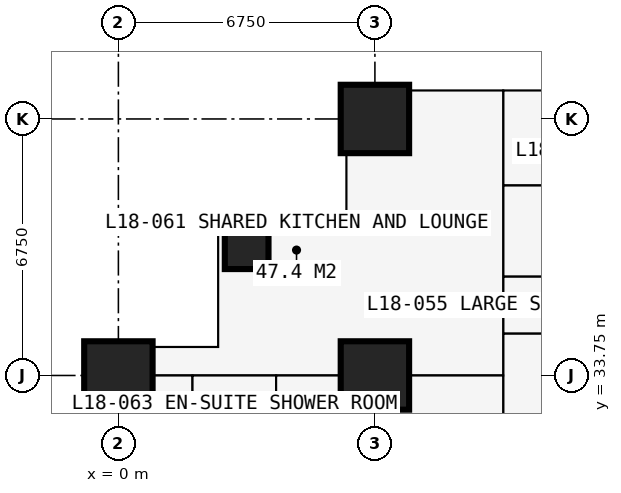
"""IFC4 building model, lengths in metres.
Left out: names, types, materials, properties, quantities, classifications, styles, units other than length and angle.
Written with IfcOpenShell. Run it as: python <this file> out.ifc"""

import sys

from ifc_helpers import new_model, si_unit, direction, frame, frame_2d, origin, origin_2d, place, context, subcontext, project, spatial, rectangle, extrude, element, fill, save


model = new_model("IFC4")
c1 = context("Model", 3, precision=1e-05, world=origin(), true_north=direction((0.0, 1.0)))
c2 = subcontext(c1, "Body", "Model", "MODEL_VIEW")
j1 = project(units=[si_unit("LENGTHUNIT", "METRE"), si_unit("PLANEANGLEUNIT", "RADIAN")], contexts=[c1])
p1 = place(None, origin())
s1 = spatial("IfcSite", under=j1, at=p1, CompositionType="ELEMENT")
p2 = place(p1, origin())
s2 = spatial("IfcBuilding", under=s1, at=p2, CompositionType="ELEMENT")
p3 = place(p2, frame((0.0, 0.0, 68.4)))
s3 = spatial("IfcBuildingStorey", under=s2, at=p3, CompositionType="ELEMENT", Elevation=68.4)
p4 = place(p3, frame((0.0, 33.75, 0.0), z_axis=(0.0, 0.0, 1.0), x_axis=(1.0, 0.0, 0.0)))
e1 = element("IfcColumn", 1, at=p4, inside=s3, PredefinedType="COLUMN", context=c2, shape_type="SweptSolid", body=[
    extrude(rectangle(XDim=1.8, YDim=1.8, at=origin_2d()), origin(), (0.0, 0.0, 1.0), 3.6),
])
p5 = place(p3, frame((3.375, 37.125, 0.0), z_axis=(0.0, 0.0, 1.0), x_axis=(1.0, 0.0, 0.0)))
e2 = element("IfcColumn", 2, at=p5, inside=s3, PredefinedType="COLUMN", context=c2, shape_type="SweptSolid", body=[
    extrude(rectangle(XDim=1.15, YDim=1.15, at=origin_2d()), origin(), (0.0, 0.0, 1.0), 3.6),
])
for number, where, z_axis, x_axis in (
    (3, (6.75, 33.75, 0.0), (0.0, 0.0, 1.0), (1.0, 0.0, 0.0)),
    (4, (6.75, 40.5, 0.0), (0.0, 0.0, 1.0), (1.0, 0.0, 0.0)),
):
    element("IfcColumn", number, at=place(p3, frame(where, z_axis=z_axis, x_axis=x_axis)), inside=s3, PredefinedType="COLUMN", context=c2, shape_type="SweptSolid", body=[
        extrude(rectangle(XDim=1.8, YDim=1.8, at=origin_2d()), origin(), (0.0, 0.0, 1.0), 3.6),
    ])
p6 = place(p3, frame((6.0, 41.25, 0.0), z_axis=(0.0, 0.0, 1.0), x_axis=(0.0, -1.0, 0.0)))
e5 = element("IfcWall", 5, at=p6, inside=s3, PredefinedType="SOLIDWALL", context=c2, shape_type="SweptSolid", body=[
    extrude(rectangle(XDim=3.375, YDim=0.3, at=frame_2d((1.688, 0.0))), origin(), (0.0, 0.0, 1.0), 3.375),
])
p7 = place(p6, frame((1.833, 0.0, 0.9)))
e6 = element("IfcOpeningElement", 6, at=p7, cuts=e5, PredefinedType="OPENING", context=c2, shape_type="SweptSolid", body=[
    extrude(rectangle(XDim=1.2, YDim=1.8, at=frame_2d((0.6, 0.9))), frame((0.0, 0.16, 0.0), z_axis=(0.0, -1.0, 0.0), x_axis=(1.0, 0.0, 0.0)), (0.0, 0.0, 1.0), 0.32),
])
p8 = place(p3, frame((6.0, 37.875, 0.0), z_axis=(0.0, 0.0, 1.0), x_axis=(-1.0, 0.0, 0.0)))
e7 = element("IfcWall", 7, at=p8, inside=s3, PredefinedType="SOLIDWALL", context=c2, shape_type="SweptSolid", body=[
    extrude(rectangle(XDim=3.375, YDim=0.3, at=frame_2d((1.688, 0.0))), origin(), (0.0, 0.0, 1.0), 3.375),
])
p9 = place(p8, frame((0.788, 0.0, 0.6)))
e8 = element("IfcOpeningElement", 8, at=p9, cuts=e7, PredefinedType="OPENING", context=c2, shape_type="SweptSolid", body=[
    extrude(rectangle(XDim=1.8, YDim=2.1, at=frame_2d((0.9, 1.05))), frame((0.0, 0.16, 0.0), z_axis=(0.0, -1.0, 0.0), x_axis=(1.0, 0.0, 0.0)), (0.0, 0.0, 1.0), 0.32),
])
p10 = place(p3, frame((2.625, 37.875, 0.0), z_axis=(0.0, 0.0, 1.0), x_axis=(0.0, -1.0, 0.0)))
e9 = element("IfcWall", 9, at=p10, inside=s3, PredefinedType="SOLIDWALL", context=c2, shape_type="SweptSolid", body=[
    extrude(rectangle(XDim=3.375, YDim=0.3, at=frame_2d((1.688, 0.0))), origin(), (0.0, 0.0, 1.0), 3.375),
])
p11 = place(p10, frame((0.788, 0.0, 0.6)))
e10 = element("IfcOpeningElement", 10, at=p11, cuts=e9, PredefinedType="OPENING", context=c2, shape_type="SweptSolid", body=[
    extrude(rectangle(XDim=1.8, YDim=2.1, at=frame_2d((0.9, 1.05))), frame((0.0, 0.16, 0.0), z_axis=(0.0, -1.0, 0.0), x_axis=(1.0, 0.0, 0.0)), (0.0, 0.0, 1.0), 0.32),
])
p12 = place(p3, frame((2.625, 34.5, 0.0), z_axis=(0.0, 0.0, 1.0), x_axis=(-1.0, 0.0, 0.0)))
e11 = element("IfcWall", 11, at=p12, inside=s3, PredefinedType="SOLIDWALL", context=c2, shape_type="SweptSolid", body=[
    extrude(rectangle(XDim=3.375, YDim=0.3, at=frame_2d((1.688, 0.0))), origin(), (0.0, 0.0, 1.0), 3.375),
])
p13 = place(p12, frame((0.343, 0.0, 0.9)))
e12 = element("IfcOpeningElement", 12, at=p13, cuts=e11, PredefinedType="OPENING", context=c2, shape_type="SweptSolid", body=[
    extrude(rectangle(XDim=1.2, YDim=1.8, at=frame_2d((0.6, 0.9))), frame((0.0, 0.16, 0.0), z_axis=(0.0, -1.0, 0.0), x_axis=(1.0, 0.0, 0.0)), (0.0, 0.0, 1.0), 0.32),
])
p14 = place(p3, frame((-0.734, 33.75, 0.0), z_axis=(0.0, 0.0, 1.0), x_axis=(1.0, 0.0, 0.0)))
e13 = element("IfcWall", 13, at=p14, inside=s3, PredefinedType="PARTITIONING", context=c2, shape_type="SweptSolid", body=[
    extrude(rectangle(XDim=10.859, YDim=0.15, at=frame_2d((5.429, 0.0))), origin(), (0.0, 0.0, 1.0), 2.877),
])
p15 = place(p14, frame((8.434, 0.0, 0.0)))
e14 = element("IfcOpeningElement", 14, at=p15, cuts=e13, PredefinedType="OPENING", context=c2, shape_type="SweptSolid", body=[
    extrude(rectangle(XDim=1.0, YDim=2.2, at=frame_2d((0.5, 1.1))), frame((0.0, 0.085, 0.0), z_axis=(0.0, -1.0, 0.0), x_axis=(1.0, 0.0, 0.0)), (0.0, 0.0, 1.0), 0.17),
])
p16 = place(p3, frame((1.95, 31.75, 0.0), z_axis=(0.0, 0.0, 1.0), x_axis=(0.0, 1.0, 0.0)))
e15 = element("IfcWall", 15, at=p16, inside=s3, PredefinedType="PARTITIONING", context=c2, shape_type="SweptSolid", body=[
    extrude(rectangle(XDim=2.0, YDim=0.1, at=frame_2d((1.0, 0.0))), origin(), (0.0, 0.0, 1.0), 3.375),
])
p17 = place(p3, frame((4.15, 10.125, 0.0), z_axis=(0.0, 0.0, 1.0), x_axis=(0.0, 1.0, 0.0)))
e16 = element("IfcWall", 16, at=p17, inside=s3, PredefinedType="PARTITIONING", context=c2, shape_type="SweptSolid", body=[
    extrude(rectangle(XDim=23.625, YDim=0.15, at=frame_2d((11.812, 0.0))), origin(), (0.0, 0.0, 1.0), 3.375),
])
p18 = place(p17, frame((20.5, 0.0, 0.0)))
e17 = element("IfcOpeningElement", 17, at=p18, cuts=e16, PredefinedType="OPENING", context=c2, shape_type="SweptSolid", body=[
    extrude(rectangle(XDim=0.95, YDim=2.2, at=frame_2d((0.475, 1.1))), frame((0.0, 0.085, 0.0), z_axis=(0.0, -1.0, 0.0), x_axis=(1.0, 0.0, 0.0)), (0.0, 0.0, 1.0), 0.17),
])
p19 = place(p17, frame((17.125, 0.0, 0.0)))
e18 = element("IfcOpeningElement", 18, at=p19, cuts=e16, PredefinedType="OPENING", context=c2, shape_type="SweptSolid", body=[
    extrude(rectangle(XDim=0.95, YDim=2.2, at=frame_2d((0.475, 1.1))), frame((0.0, 0.085, 0.0), z_axis=(0.0, -1.0, 0.0), x_axis=(1.0, 0.0, 0.0)), (0.0, 0.0, 1.0), 0.17),
])
p20 = place(p17, frame((13.7, 0.0, 0.0)))
e19 = element("IfcOpeningElement", 19, at=p20, cuts=e16, PredefinedType="OPENING", context=c2, shape_type="SweptSolid", body=[
    extrude(rectangle(XDim=0.95, YDim=2.2, at=frame_2d((0.475, 1.1))), frame((0.0, 0.085, 0.0), z_axis=(0.0, -1.0, 0.0), x_axis=(1.0, 0.0, 0.0)), (0.0, 0.0, 1.0), 0.17),
])
p21 = place(p17, frame((4.2, 0.0, 0.0)))
e20 = element("IfcOpeningElement", 20, at=p21, cuts=e16, PredefinedType="OPENING", context=c2, shape_type="SweptSolid", body=[
    extrude(rectangle(XDim=0.95, YDim=2.2, at=frame_2d((0.475, 1.1))), frame((0.0, 0.085, 0.0), z_axis=(0.0, -1.0, 0.0), x_axis=(1.0, 0.0, 0.0)), (0.0, 0.0, 1.0), 0.17),
])
p22 = place(p17, frame((10.95, 0.0, 0.0)))
e21 = element("IfcOpeningElement", 21, at=p22, cuts=e16, PredefinedType="OPENING", context=c2, shape_type="SweptSolid", body=[
    extrude(rectangle(XDim=0.95, YDim=2.2, at=frame_2d((0.475, 1.1))), frame((0.0, 0.085, 0.0), z_axis=(0.0, -1.0, 0.0), x_axis=(1.0, 0.0, 0.0)), (0.0, 0.0, 1.0), 0.17),
])
p23 = place(p3, frame((10.125, 30.375, 0.0), z_axis=(0.0, 0.0, 1.0), x_axis=(0.0, 1.0, 0.0)))
e22 = element("IfcWall", 22, at=p23, inside=s3, PredefinedType="PARTITIONING", context=c2, shape_type="SweptSolid", body=[
    extrude(rectangle(XDim=10.859, YDim=0.15, at=frame_2d((5.429, 0.0))), origin(), (0.0, 0.0, 1.0), 3.375),
])
p24 = place(p3, frame((10.125, 34.85, 0.0), z_axis=(0.0, 0.0, 1.0), x_axis=(1.0, 0.0, 0.0)))
e23 = element("IfcWall", 23, at=p24, inside=s3, PredefinedType="PARTITIONING", context=c2, shape_type="SweptSolid", body=[
    extrude(rectangle(XDim=10.762, YDim=0.15, at=frame_2d((5.381, 0.0))), origin(), (0.0, 0.0, 1.0), 3.375),
])
p25 = place(p24, frame((4.9, 0.0, 0.0)))
e24 = element("IfcOpeningElement", 24, at=p25, cuts=e23, PredefinedType="OPENING", context=c2, shape_type="SweptSolid", body=[
    extrude(rectangle(XDim=0.95, YDim=2.2, at=frame_2d((0.475, 1.1))), frame((0.0, 0.085, 0.0), z_axis=(0.0, -1.0, 0.0), x_axis=(1.0, 0.0, 0.0)), (0.0, 0.0, 1.0), 0.17),
])
p26 = place(p3, frame((10.125, 36.35, 0.0), z_axis=(0.0, 0.0, 1.0), x_axis=(1.0, 0.0, 0.0)))
e25 = element("IfcWall", 25, at=p26, inside=s3, PredefinedType="PARTITIONING", context=c2, shape_type="SweptSolid", body=[
    extrude(rectangle(XDim=23.625, YDim=0.15, at=frame_2d((11.812, 0.0))), origin(), (0.0, 0.0, 1.0), 3.375),
])
p27 = place(p26, frame((21.45, 0.0, 0.0)))
e26 = element("IfcOpeningElement", 26, at=p27, cuts=e25, PredefinedType="OPENING", context=c2, shape_type="SweptSolid", body=[
    extrude(rectangle(XDim=1.0, YDim=2.2, at=frame_2d((0.5, 1.1))), frame((0.0, 0.085, 0.0), z_axis=(0.0, -1.0, 0.0), x_axis=(1.0, 0.0, 0.0)), (0.0, 0.0, 1.0), 0.17),
])
p28 = place(p26, frame((17.125, 0.0, 0.0)))
e27 = element("IfcOpeningElement", 27, at=p28, cuts=e25, PredefinedType="OPENING", context=c2, shape_type="SweptSolid", body=[
    extrude(rectangle(XDim=0.95, YDim=2.2, at=frame_2d((0.475, 1.1))), frame((0.0, 0.085, 0.0), z_axis=(0.0, -1.0, 0.0), x_axis=(1.0, 0.0, 0.0)), (0.0, 0.0, 1.0), 0.17),
])
p29 = place(p26, frame((13.7, 0.0, 0.0)))
e28 = element("IfcOpeningElement", 28, at=p29, cuts=e25, PredefinedType="OPENING", context=c2, shape_type="SweptSolid", body=[
    extrude(rectangle(XDim=0.95, YDim=2.2, at=frame_2d((0.475, 1.1))), frame((0.0, 0.085, 0.0), z_axis=(0.0, -1.0, 0.0), x_axis=(1.0, 0.0, 0.0)), (0.0, 0.0, 1.0), 0.17),
])
p30 = place(p26, frame((4.2, 0.0, 0.0)))
e29 = element("IfcOpeningElement", 29, at=p30, cuts=e25, PredefinedType="OPENING", context=c2, shape_type="SweptSolid", body=[
    extrude(rectangle(XDim=0.95, YDim=2.2, at=frame_2d((0.475, 1.1))), frame((0.0, 0.085, 0.0), z_axis=(0.0, -1.0, 0.0), x_axis=(1.0, 0.0, 0.0)), (0.0, 0.0, 1.0), 0.17),
])
p31 = place(p26, frame((10.95, 0.0, 0.0)))
e30 = element("IfcOpeningElement", 30, at=p31, cuts=e25, PredefinedType="OPENING", context=c2, shape_type="SweptSolid", body=[
    extrude(rectangle(XDim=0.95, YDim=2.2, at=frame_2d((0.475, 1.1))), frame((0.0, 0.085, 0.0), z_axis=(0.0, -1.0, 0.0), x_axis=(1.0, 0.0, 0.0)), (0.0, 0.0, 1.0), 0.17),
])
p32 = place(p3, frame((10.125, 38.75, 0.0), z_axis=(0.0, 0.0, 1.0), x_axis=(1.0, 0.0, 0.0)))
e31 = element("IfcWall", 31, at=p32, inside=s3, PredefinedType="PARTITIONING", context=c2, shape_type="SweptSolid", body=[
    extrude(rectangle(XDim=2.6, YDim=0.1, at=frame_2d((1.3, 0.0))), origin(), (0.0, 0.0, 1.0), 3.375),
])
p33 = place(p32, frame((0.85, 0.0, 0.0)))
e32 = element("IfcOpeningElement", 32, at=p33, cuts=e31, PredefinedType="OPENING", context=c2, shape_type="SweptSolid", body=[
    extrude(rectangle(XDim=0.9, YDim=2.2, at=frame_2d((0.45, 1.1))), frame((0.0, 0.06, 0.0), z_axis=(0.0, -1.0, 0.0), x_axis=(1.0, 0.0, 0.0)), (0.0, 0.0, 1.0), 0.12),
])
p34 = place(p7, origin())
e33 = element("IfcWindow", 33, at=p34, inside=s3, PartitioningType="SINGLE_PANEL", PredefinedType="WINDOW", context=c2, shape_type="SweptSolid", body=[
    extrude(rectangle(XDim=1.2, YDim=1.8, at=frame_2d((0.6, 0.9))), frame((0.0, 0.03, 0.0), z_axis=(0.0, -1.0, 0.0), x_axis=(1.0, 0.0, 0.0)), (0.0, 0.0, 1.0), 0.06),
])
fill(e6, e33)
p35 = place(p9, origin())
e34 = element("IfcWindow", 34, at=p35, inside=s3, PartitioningType="SINGLE_PANEL", PredefinedType="WINDOW", context=c2, shape_type="SweptSolid", body=[
    extrude(rectangle(XDim=1.8, YDim=2.1, at=frame_2d((0.9, 1.05))), frame((0.0, 0.03, 0.0), z_axis=(0.0, -1.0, 0.0), x_axis=(1.0, 0.0, 0.0)), (0.0, 0.0, 1.0), 0.06),
])
fill(e8, e34)
p36 = place(p11, origin())
e35 = element("IfcWindow", 35, at=p36, inside=s3, PartitioningType="SINGLE_PANEL", PredefinedType="WINDOW", context=c2, shape_type="SweptSolid", body=[
    extrude(rectangle(XDim=1.8, YDim=2.1, at=frame_2d((0.9, 1.05))), frame((0.0, 0.03, 0.0), z_axis=(0.0, -1.0, 0.0), x_axis=(1.0, 0.0, 0.0)), (0.0, 0.0, 1.0), 0.06),
])
fill(e10, e35)
p37 = place(p13, origin())
e36 = element("IfcWindow", 36, at=p37, inside=s3, PartitioningType="SINGLE_PANEL", PredefinedType="WINDOW", context=c2, shape_type="SweptSolid", body=[
    extrude(rectangle(XDim=1.2, YDim=1.8, at=frame_2d((0.6, 0.9))), frame((0.0, 0.03, 0.0), z_axis=(0.0, -1.0, 0.0), x_axis=(1.0, 0.0, 0.0)), (0.0, 0.0, 1.0), 0.06),
])
fill(e12, e36)
p38 = place(p33, origin())
e37 = element("IfcDoor", 37, at=p38, inside=s3, OperationType="SINGLE_SWING_RIGHT", PredefinedType="DOOR", context=c2, shape_type="SweptSolid", body=[
    extrude(rectangle(XDim=0.9, YDim=2.2, at=frame_2d((0.45, 1.1))), frame((0.0, 0.025, 0.0), z_axis=(0.0, -1.0, 0.0), x_axis=(1.0, 0.0, 0.0)), (0.0, 0.0, 1.0), 0.05),
])
fill(e32, e37)
p39 = place(p15, origin())
e38 = element("IfcDoor", 38, at=p39, inside=s3, OperationType="SINGLE_SWING_LEFT", PredefinedType="DOOR", context=c2, shape_type="SweptSolid", body=[
    extrude(rectangle(XDim=1.0, YDim=2.2, at=frame_2d((0.5, 1.1))), frame((0.0, 0.025, 0.0), z_axis=(0.0, -1.0, 0.0), x_axis=(1.0, 0.0, 0.0)), (0.0, 0.0, 1.0), 0.05),
])
fill(e14, e38)
save(model, sys.argv[1])
